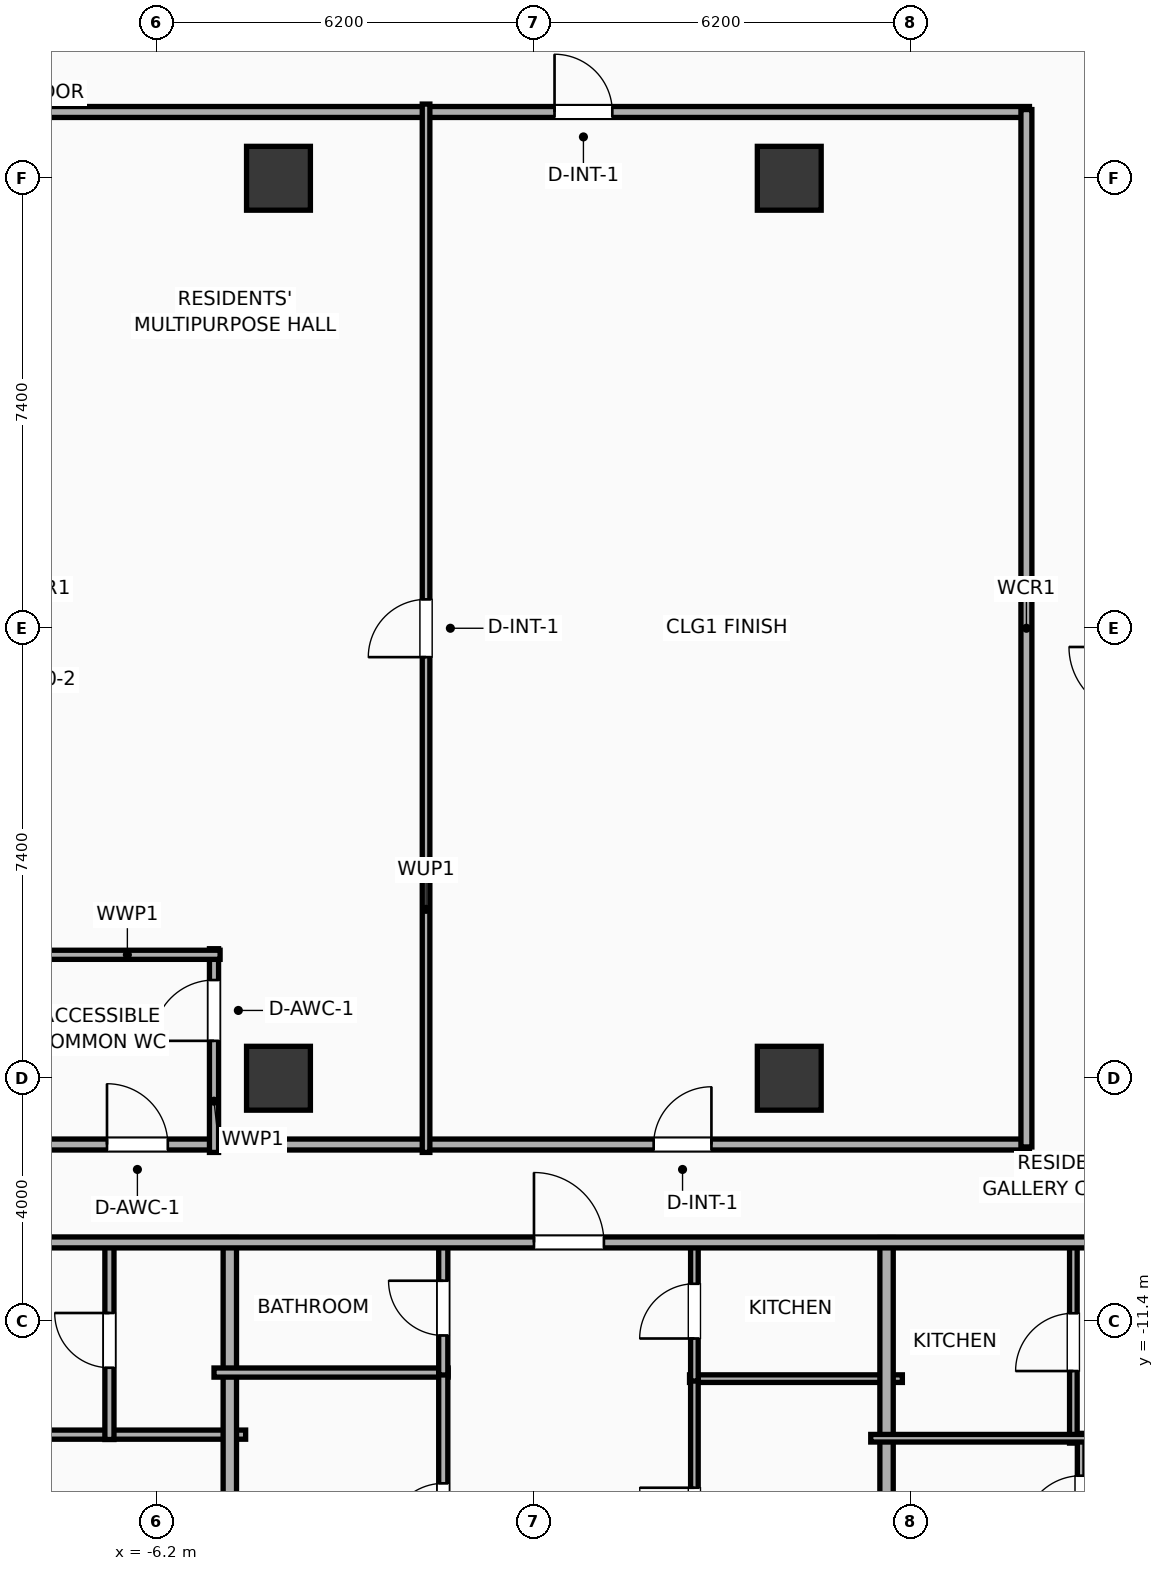
"""IFC4 building model, lengths in metres.
Left out: names, types, materials, properties, quantities, classifications, styles, units other than length and angle.
Written with IfcOpenShell. Run it as: python <this file> out.ifc"""

import sys

from ifc_helpers import new_model, si_unit, direction, frame, frame_2d, origin, origin_2d, place, context, subcontext, project, spatial, rectangle, extrude, element, fill, save


model = new_model("IFC4")
c1 = context("Model", 3, precision=1e-05, world=origin(), true_north=direction((0.0, 1.0)))
c2 = subcontext(c1, "Body", "Model", "MODEL_VIEW")
j1 = project(units=[si_unit("LENGTHUNIT", "METRE"), si_unit("PLANEANGLEUNIT", "RADIAN")], contexts=[c1])
p1 = place(None, origin())
s1 = spatial("IfcSite", under=j1, at=p1, CompositionType="ELEMENT")
p2 = place(p1, origin())
s2 = spatial("IfcBuilding", under=s1, at=p2, CompositionType="ELEMENT")
p3 = place(p2, frame((0.0, 0.0, 101.4)))
s3 = spatial("IfcBuildingStorey", under=s2, at=p3, CompositionType="ELEMENT", Elevation=101.4)
for number, where, z_axis, x_axis in (
    (1, (-4.2, -7.4, 0.0), (0.0, 0.0, 1.0), (1.0, 0.0, 0.0)),
    (2, (-4.2, 7.4, 0.0), (0.0, 0.0, 1.0), (1.0, 0.0, 0.0)),
    (3, (4.2, -7.4, 0.0), (0.0, 0.0, 1.0), (1.0, 0.0, 0.0)),
    (4, (4.2, 7.4, 0.0), (0.0, 0.0, 1.0), (1.0, 0.0, 0.0)),
):
    element("IfcColumn", number, at=place(p3, frame(where, z_axis=z_axis, x_axis=x_axis)), inside=s3, PredefinedType="COLUMN", context=c2, shape_type="SweptSolid", body=[
        extrude(rectangle(XDim=1.05, YDim=1.05, at=origin_2d()), origin(), (0.0, 0.0, 1.0), 3.9),
    ])
p4 = place(p3, frame((-8.15, 8.49, 0.0), z_axis=(0.0, 0.0, 1.0), x_axis=(1.0, 0.0, 0.0)))
e5 = element("IfcWall", 5, at=p4, inside=s3, PredefinedType="PARTITIONING", context=c2, shape_type="SweptSolid", body=[
    extrude(rectangle(XDim=16.3, YDim=0.18, at=frame_2d((8.15, 0.0))), origin(), (0.0, 0.0, 1.0), 3.65),
])
p5 = place(p4, frame((8.49, 0.0, 0.0)))
e6 = element("IfcOpeningElement", 6, at=p5, cuts=e5, PredefinedType="OPENING", context=c2, shape_type="SweptSolid", body=[
    extrude(rectangle(XDim=0.95, YDim=2.05, at=frame_2d((0.475, 1.025))), frame((0.0, 0.1, 0.0), z_axis=(0.0, -1.0, 0.0), x_axis=(1.0, 0.0, 0.0)), (0.0, 0.0, 1.0), 0.2),
])
p6 = place(p3, frame((-8.15, -8.49, 0.0), z_axis=(0.0, 0.0, 1.0), x_axis=(1.0, 0.0, 0.0)))
e7 = element("IfcWall", 7, at=p6, inside=s3, PredefinedType="PARTITIONING", context=c2, shape_type="SweptSolid", body=[
    extrude(rectangle(XDim=16.3, YDim=0.18, at=frame_2d((8.15, 0.0))), origin(), (0.0, 0.0, 1.0), 3.65),
])
p7 = place(p6, frame((1.13, 0.0, 0.0)))
e8 = element("IfcOpeningElement", 8, at=p7, cuts=e7, PredefinedType="OPENING", context=c2, shape_type="SweptSolid", body=[
    extrude(rectangle(XDim=1.0, YDim=2.05, at=frame_2d((0.5, 1.025))), frame((0.0, 0.1, 0.0), z_axis=(0.0, -1.0, 0.0), x_axis=(1.0, 0.0, 0.0)), (0.0, 0.0, 1.0), 0.2),
])
p8 = place(p6, frame((10.12, 0.0, 0.0)))
e9 = element("IfcOpeningElement", 9, at=p8, cuts=e7, PredefinedType="OPENING", context=c2, shape_type="SweptSolid", body=[
    extrude(rectangle(XDim=0.95, YDim=2.05, at=frame_2d((0.475, 1.025))), frame((0.0, 0.1, 0.0), z_axis=(0.0, -1.0, 0.0), x_axis=(1.0, 0.0, 0.0)), (0.0, 0.0, 1.0), 0.2),
])
p9 = place(p3, frame((8.1, -8.53, 0.0), z_axis=(0.0, 0.0, 1.0), x_axis=(0.0, 1.0, 0.0)))
e10 = element("IfcWall", 10, at=p9, inside=s3, PredefinedType="PARTITIONING", context=c2, shape_type="SweptSolid", body=[
    extrude(rectangle(XDim=17.06, YDim=0.18, at=frame_2d((8.53, 0.0))), origin(), (0.0, 0.0, 1.0), 3.65),
])
p10 = place(p3, frame((-5.26, -8.62, 0.0), z_axis=(0.0, 0.0, 1.0), x_axis=(0.0, 1.0, 0.0)))
e11 = element("IfcWall", 11, at=p10, inside=s3, PredefinedType="PLUMBINGWALL", context=c2, shape_type="SweptSolid", body=[
    extrude(rectangle(XDim=3.35, YDim=0.15, at=frame_2d((1.675, 0.0))), origin(), (0.0, 0.0, 1.0), 3.65),
])
p11 = place(p10, frame((1.835, 0.0, 0.0)))
e12 = element("IfcOpeningElement", 12, at=p11, cuts=e11, PredefinedType="OPENING", context=c2, shape_type="SweptSolid", body=[
    extrude(rectangle(XDim=1.0, YDim=2.05, at=frame_2d((0.5, 1.025))), frame((0.0, 0.085, 0.0), z_axis=(0.0, -1.0, 0.0), x_axis=(1.0, 0.0, 0.0)), (0.0, 0.0, 1.0), 0.17),
])
p12 = place(p3, frame((-8.21, -5.37, 0.0), z_axis=(0.0, 0.0, 1.0), x_axis=(1.0, 0.0, 0.0)))
e13 = element("IfcWall", 13, at=p12, inside=s3, PredefinedType="PLUMBINGWALL", context=c2, shape_type="SweptSolid", body=[
    extrude(rectangle(XDim=3.05, YDim=0.15, at=frame_2d((1.525, 0.0))), origin(), (0.0, 0.0, 1.0), 3.65),
])
p13 = place(p3, frame((-1.773, -8.62, 0.0), z_axis=(0.0, 0.0, 1.0), x_axis=(0.0, 1.0, 0.0)))
e14 = element("IfcWall", 14, at=p13, inside=s3, PredefinedType="PARTITIONING", context=c2, shape_type="SweptSolid", body=[
    extrude(rectangle(XDim=17.24, YDim=0.125, at=frame_2d((8.62, 0.0))), origin(), (0.0, 0.0, 1.0), 3.65),
])
p14 = place(p13, frame((8.145, 0.0, 0.0)))
e15 = element("IfcOpeningElement", 15, at=p14, cuts=e14, PredefinedType="OPENING", context=c2, shape_type="SweptSolid", body=[
    extrude(rectangle(XDim=0.95, YDim=2.05, at=frame_2d((0.475, 1.025))), frame((0.0, 0.073, 0.0), z_axis=(0.0, -1.0, 0.0), x_axis=(1.0, 0.0, 0.0)), (0.0, 0.0, 1.0), 0.145),
])
p15 = place(p3, frame((-8.53, -13.261, 0.0), z_axis=(0.0, 0.0, 1.0), x_axis=(1.0, 0.0, 0.0)))
e16 = element("IfcWall", 16, at=p15, inside=s3, PredefinedType="PLUMBINGWALL", context=c2, shape_type="SweptSolid", body=[
    extrude(rectangle(XDim=3.79, YDim=0.15, at=frame_2d((1.895, 0.0))), origin(), (0.0, 0.0, 1.0), 3.65),
])
p16 = place(p3, frame((-6.98, -13.341, 0.0), z_axis=(0.0, 0.0, 1.0), x_axis=(0.0, 1.0, 0.0)))
e17 = element("IfcWall", 17, at=p16, inside=s3, PredefinedType="PLUMBINGWALL", context=c2, shape_type="SweptSolid", body=[
    extrude(rectangle(XDim=3.261, YDim=0.15, at=frame_2d((1.63, 0.0))), origin(), (0.0, 0.0, 1.0), 3.65),
])
p17 = place(p16, frame((1.18, 0.0, 0.0)))
e18 = element("IfcOpeningElement", 18, at=p17, cuts=e17, PredefinedType="OPENING", context=c2, shape_type="SweptSolid", body=[
    extrude(rectangle(XDim=0.9, YDim=2.05, at=frame_2d((0.45, 1.025))), frame((0.0, 0.085, 0.0), z_axis=(0.0, -1.0, 0.0), x_axis=(1.0, 0.0, 0.0)), (0.0, 0.0, 1.0), 0.17),
])
p18 = place(p3, frame((-5.0, -20.41, 0.0), z_axis=(0.0, 0.0, 1.0), x_axis=(0.0, 1.0, 0.0)))
e19 = element("IfcWall", 19, at=p18, inside=s3, PredefinedType="PARTITIONING", context=c2, shape_type="SweptSolid", body=[
    extrude(rectangle(XDim=10.39, YDim=0.22, at=frame_2d((5.195, 0.0))), origin(), (0.0, 0.0, 1.0), 3.65),
])
p19 = place(p3, frame((-5.26, -12.24, 0.0), z_axis=(0.0, 0.0, 1.0), x_axis=(1.0, 0.0, 0.0)))
e20 = element("IfcWall", 20, at=p19, inside=s3, PredefinedType="PLUMBINGWALL", context=c2, shape_type="SweptSolid", body=[
    extrude(rectangle(XDim=3.85, YDim=0.15, at=frame_2d((1.925, 0.0))), origin(), (0.0, 0.0, 1.0), 3.65),
])
p20 = place(p3, frame((2.56, -12.34, 0.0), z_axis=(0.0, 0.0, 1.0), x_axis=(1.0, 0.0, 0.0)))
e21 = element("IfcWall", 21, at=p20, inside=s3, PredefinedType="PARTITIONING", context=c2, shape_type="SweptSolid", body=[
    extrude(rectangle(XDim=3.5, YDim=0.125, at=frame_2d((1.75, 0.0))), origin(), (0.0, 0.0, 1.0), 3.65),
])
p21 = place(p3, frame((-1.49, -20.458, 0.0), z_axis=(0.0, 0.0, 1.0), x_axis=(0.0, 1.0, 0.0)))
e22 = element("IfcWall", 22, at=p21, inside=s3, PredefinedType="PLUMBINGWALL", context=c2, shape_type="SweptSolid", body=[
    extrude(rectangle(XDim=8.258, YDim=0.15, at=frame_2d((4.129, 0.0))), origin(), (0.0, 0.0, 1.0), 3.65),
])
p22 = place(p21, frame((5.496, 0.0, 0.0)))
e23 = element("IfcOpeningElement", 23, at=p22, cuts=e22, PredefinedType="OPENING", context=c2, shape_type="SweptSolid", body=[
    extrude(rectangle(XDim=0.9, YDim=2.05, at=frame_2d((0.45, 1.025))), frame((0.0, 0.085, 0.0), z_axis=(0.0, -1.0, 0.0), x_axis=(1.0, 0.0, 0.0)), (0.0, 0.0, 1.0), 0.17),
])
p23 = place(p3, frame((-1.49, -12.28, 0.0), z_axis=(0.0, 0.0, 1.0), x_axis=(0.0, 1.0, 0.0)))
e24 = element("IfcWall", 24, at=p23, inside=s3, PredefinedType="PLUMBINGWALL", context=c2, shape_type="SweptSolid", body=[
    extrude(rectangle(XDim=2.2, YDim=0.15, at=frame_2d((1.1, 0.0))), origin(), (0.0, 0.0, 1.0), 3.65),
])
p24 = place(p23, frame((0.65, 0.0, 0.0)))
e25 = element("IfcOpeningElement", 25, at=p24, cuts=e24, PredefinedType="OPENING", context=c2, shape_type="SweptSolid", body=[
    extrude(rectangle(XDim=0.9, YDim=2.05, at=frame_2d((0.45, 1.025))), frame((0.0, 0.085, 0.0), z_axis=(0.0, -1.0, 0.0), x_axis=(1.0, 0.0, 0.0)), (0.0, 0.0, 1.0), 0.17),
])
p25 = place(p3, frame((2.64, -20.458, 0.0), z_axis=(0.0, 0.0, 1.0), x_axis=(0.0, 1.0, 0.0)))
e26 = element("IfcWall", 26, at=p25, inside=s3, PredefinedType="PARTITIONING", context=c2, shape_type="SweptSolid", body=[
    extrude(rectangle(XDim=8.157, YDim=0.125, at=frame_2d((4.079, 0.0))), origin(), (0.0, 0.0, 1.0), 3.65),
])
p26 = place(p25, frame((5.424, 0.0, 0.0)))
e27 = element("IfcOpeningElement", 27, at=p26, cuts=e26, PredefinedType="OPENING", context=c2, shape_type="SweptSolid", body=[
    extrude(rectangle(XDim=0.9, YDim=2.05, at=frame_2d((0.45, 1.025))), frame((0.0, 0.073, 0.0), z_axis=(0.0, -1.0, 0.0), x_axis=(1.0, 0.0, 0.0)), (0.0, 0.0, 1.0), 0.145),
])
p27 = place(p3, frame((2.64, -12.38, 0.0), z_axis=(0.0, 0.0, 1.0), x_axis=(0.0, 1.0, 0.0)))
e28 = element("IfcWall", 28, at=p27, inside=s3, PredefinedType="PARTITIONING", context=c2, shape_type="SweptSolid", body=[
    extrude(rectangle(XDim=2.3, YDim=0.125, at=frame_2d((1.15, 0.0))), origin(), (0.0, 0.0, 1.0), 3.65),
])
p28 = place(p27, frame((0.7, 0.0, 0.0)))
e29 = element("IfcOpeningElement", 29, at=p28, cuts=e28, PredefinedType="OPENING", context=c2, shape_type="SweptSolid", body=[
    extrude(rectangle(XDim=0.9, YDim=2.05, at=frame_2d((0.45, 1.025))), frame((0.0, 0.073, 0.0), z_axis=(0.0, -1.0, 0.0), x_axis=(1.0, 0.0, 0.0)), (0.0, 0.0, 1.0), 0.145),
])
p29 = place(p3, frame((5.8, -20.41, 0.0), z_axis=(0.0, 0.0, 1.0), x_axis=(0.0, 1.0, 0.0)))
e30 = element("IfcWall", 30, at=p29, inside=s3, PredefinedType="PARTITIONING", context=c2, shape_type="SweptSolid", body=[
    extrude(rectangle(XDim=10.39, YDim=0.22, at=frame_2d((5.195, 0.0))), origin(), (0.0, 0.0, 1.0), 3.04),
])
p30 = place(p3, frame((9.0, -20.56, 0.0), z_axis=(0.0, 0.0, 1.0), x_axis=(0.0, 1.0, 0.0)))
e31 = element("IfcWall", 31, at=p30, inside=s3, PredefinedType="PARTITIONING", context=c2, shape_type="SweptSolid", body=[
    extrude(rectangle(XDim=7.32, YDim=0.125, at=frame_2d((3.66, 0.0))), origin(), (0.0, 0.0, 1.0), 3.65),
])
p31 = place(p30, frame((5.674, 0.0, 0.0)))
e32 = element("IfcOpeningElement", 32, at=p31, cuts=e31, PredefinedType="OPENING", context=c2, shape_type="SweptSolid", body=[
    extrude(rectangle(XDim=0.95, YDim=2.05, at=frame_2d((0.475, 1.025))), frame((0.0, 0.073, 0.0), z_axis=(0.0, -1.0, 0.0), x_axis=(1.0, 0.0, 0.0)), (0.0, 0.0, 1.0), 0.145),
])
p32 = place(p3, frame((8.872, -13.4, 0.0), z_axis=(0.0, 0.0, 1.0), x_axis=(0.0, 1.0, 0.0)))
e33 = element("IfcWall", 33, at=p32, inside=s3, PredefinedType="PARTITIONING", context=c2, shape_type="SweptSolid", body=[
    extrude(rectangle(XDim=3.32, YDim=0.125, at=frame_2d((1.66, 0.0))), origin(), (0.0, 0.0, 1.0), 3.65),
])
p33 = place(p32, frame((1.185, 0.0, 0.0)))
e34 = element("IfcOpeningElement", 34, at=p33, cuts=e33, PredefinedType="OPENING", context=c2, shape_type="SweptSolid", body=[
    extrude(rectangle(XDim=0.95, YDim=2.05, at=frame_2d((0.475, 1.025))), frame((0.0, 0.073, 0.0), z_axis=(0.0, -1.0, 0.0), x_axis=(1.0, 0.0, 0.0)), (0.0, 0.0, 1.0), 0.145),
])
p34 = place(p3, frame((5.54, -13.32, 0.0), z_axis=(0.0, 0.0, 1.0), x_axis=(1.0, 0.0, 0.0)))
e35 = element("IfcWall", 35, at=p34, inside=s3, PredefinedType="PARTITIONING", context=c2, shape_type="SweptSolid", body=[
    extrude(rectangle(XDim=3.58, YDim=0.125, at=frame_2d((1.79, 0.0))), origin(), (0.0, 0.0, 1.0), 3.65),
])
p35 = place(p3, frame((-29.21, -10.1, 0.0), z_axis=(0.0, 0.0, 1.0), x_axis=(1.0, 0.0, 0.0)))
e36 = element("IfcWall", 36, at=p35, inside=s3, PredefinedType="PARTITIONING", context=c2, shape_type="SweptSolid", body=[
    extrude(rectangle(XDim=62.42, YDim=0.18, at=frame_2d((31.21, 0.0))), origin(), (0.0, 0.0, 1.0), 3.65),
])
p36 = place(p35, frame((3.033, 0.0, 0.0)))
e37 = element("IfcOpeningElement", 37, at=p36, cuts=e36, PredefinedType="OPENING", context=c2, shape_type="SweptSolid", body=[
    extrude(rectangle(XDim=0.9, YDim=2.05, at=frame_2d((0.45, 1.025))), frame((0.0, 0.1, 0.0), z_axis=(0.0, -1.0, 0.0), x_axis=(1.0, 0.0, 0.0)), (0.0, 0.0, 1.0), 0.2),
])
p37 = place(p35, frame((9.768, 0.0, 0.0)))
e38 = element("IfcOpeningElement", 38, at=p37, cuts=e36, PredefinedType="OPENING", context=c2, shape_type="SweptSolid", body=[
    extrude(rectangle(XDim=0.9, YDim=2.05, at=frame_2d((0.45, 1.025))), frame((0.0, 0.1, 0.0), z_axis=(0.0, -1.0, 0.0), x_axis=(1.0, 0.0, 0.0)), (0.0, 0.0, 1.0), 0.2),
])
p38 = place(p35, frame((18.65, 0.0, 0.0)))
e39 = element("IfcOpeningElement", 39, at=p38, cuts=e36, PredefinedType="OPENING", context=c2, shape_type="SweptSolid", body=[
    extrude(rectangle(XDim=1.15, YDim=2.05, at=frame_2d((0.575, 1.025))), frame((0.0, 0.1, 0.0), z_axis=(0.0, -1.0, 0.0), x_axis=(1.0, 0.0, 0.0)), (0.0, 0.0, 1.0), 0.2),
])
p39 = place(p35, frame((29.212, 0.0, 0.0)))
e40 = element("IfcOpeningElement", 40, at=p39, cuts=e36, PredefinedType="OPENING", context=c2, shape_type="SweptSolid", body=[
    extrude(rectangle(XDim=1.15, YDim=2.05, at=frame_2d((0.575, 1.025))), frame((0.0, 0.1, 0.0), z_axis=(0.0, -1.0, 0.0), x_axis=(1.0, 0.0, 0.0)), (0.0, 0.0, 1.0), 0.2),
])
p40 = place(p35, frame((40.379, 0.0, 0.0)))
e41 = element("IfcOpeningElement", 41, at=p40, cuts=e36, PredefinedType="OPENING", context=c2, shape_type="SweptSolid", body=[
    extrude(rectangle(XDim=1.15, YDim=2.05, at=frame_2d((0.575, 1.025))), frame((0.0, 0.1, 0.0), z_axis=(0.0, -1.0, 0.0), x_axis=(1.0, 0.0, 0.0)), (0.0, 0.0, 1.0), 0.2),
])
p41 = place(p35, frame((50.959, 0.0, 0.0)))
e42 = element("IfcOpeningElement", 42, at=p41, cuts=e36, PredefinedType="OPENING", context=c2, shape_type="SweptSolid", body=[
    extrude(rectangle(XDim=1.15, YDim=2.05, at=frame_2d((0.575, 1.025))), frame((0.0, 0.1, 0.0), z_axis=(0.0, -1.0, 0.0), x_axis=(1.0, 0.0, 0.0)), (0.0, 0.0, 1.0), 0.2),
])
p42 = place(p35, frame((59.117, 0.0, 0.0)))
e43 = element("IfcOpeningElement", 43, at=p42, cuts=e36, PredefinedType="OPENING", context=c2, shape_type="SweptSolid", body=[
    extrude(rectangle(XDim=0.9, YDim=2.05, at=frame_2d((0.45, 1.025))), frame((0.0, 0.1, 0.0), z_axis=(0.0, -1.0, 0.0), x_axis=(1.0, 0.0, 0.0)), (0.0, 0.0, 1.0), 0.2),
])
p43 = place(p5, origin())
e44 = element("IfcDoor", 44, at=p43, inside=s3, OperationType="SINGLE_SWING_LEFT", PredefinedType="DOOR", context=c2, shape_type="SweptSolid", body=[
    extrude(rectangle(XDim=0.95, YDim=2.05, at=frame_2d((0.475, 1.025))), frame((0.0, 0.025, 0.0), z_axis=(0.0, -1.0, 0.0), x_axis=(1.0, 0.0, 0.0)), (0.0, 0.0, 1.0), 0.05),
])
fill(e6, e44)
p44 = place(p7, origin())
e45 = element("IfcDoor", 45, at=p44, inside=s3, OperationType="SINGLE_SWING_LEFT", PredefinedType="DOOR", context=c2, shape_type="SweptSolid", body=[
    extrude(rectangle(XDim=1.0, YDim=2.05, at=frame_2d((0.5, 1.025))), frame((0.0, 0.025, 0.0), z_axis=(0.0, -1.0, 0.0), x_axis=(1.0, 0.0, 0.0)), (0.0, 0.0, 1.0), 0.05),
])
fill(e8, e45)
p45 = place(p8, origin())
e46 = element("IfcDoor", 46, at=p45, inside=s3, OperationType="SINGLE_SWING_RIGHT", PredefinedType="DOOR", context=c2, shape_type="SweptSolid", body=[
    extrude(rectangle(XDim=0.95, YDim=2.05, at=frame_2d((0.475, 1.025))), frame((0.0, 0.025, 0.0), z_axis=(0.0, -1.0, 0.0), x_axis=(1.0, 0.0, 0.0)), (0.0, 0.0, 1.0), 0.05),
])
fill(e9, e46)
p46 = place(p11, origin())
e47 = element("IfcDoor", 47, at=p46, inside=s3, OperationType="SINGLE_SWING_LEFT", PredefinedType="DOOR", context=c2, shape_type="SweptSolid", body=[
    extrude(rectangle(XDim=1.0, YDim=2.05, at=frame_2d((0.5, 1.025))), frame((0.0, 0.025, 0.0), z_axis=(0.0, -1.0, 0.0), x_axis=(1.0, 0.0, 0.0)), (0.0, 0.0, 1.0), 0.05),
])
fill(e12, e47)
p47 = place(p14, origin())
e48 = element("IfcDoor", 48, at=p47, inside=s3, OperationType="SINGLE_SWING_LEFT", PredefinedType="DOOR", context=c2, shape_type="SweptSolid", body=[
    extrude(rectangle(XDim=0.95, YDim=2.05, at=frame_2d((0.475, 1.025))), frame((0.0, 0.025, 0.0), z_axis=(0.0, -1.0, 0.0), x_axis=(1.0, 0.0, 0.0)), (0.0, 0.0, 1.0), 0.05),
])
fill(e15, e48)
p48 = place(p17, origin())
e49 = element("IfcDoor", 49, at=p48, inside=s3, OperationType="SINGLE_SWING_RIGHT", PredefinedType="DOOR", context=c2, shape_type="SweptSolid", body=[
    extrude(rectangle(XDim=0.9, YDim=2.05, at=frame_2d((0.45, 1.025))), frame((0.0, 0.025, 0.0), z_axis=(0.0, -1.0, 0.0), x_axis=(1.0, 0.0, 0.0)), (0.0, 0.0, 1.0), 0.05),
])
fill(e18, e49)
p49 = place(p22, origin())
e50 = element("IfcDoor", 50, at=p49, inside=s3, OperationType="SINGLE_SWING_LEFT", PredefinedType="DOOR", context=c2, shape_type="SweptSolid", body=[
    extrude(rectangle(XDim=0.9, YDim=2.05, at=frame_2d((0.45, 1.025))), frame((0.0, 0.025, 0.0), z_axis=(0.0, -1.0, 0.0), x_axis=(1.0, 0.0, 0.0)), (0.0, 0.0, 1.0), 0.05),
])
fill(e23, e50)
p50 = place(p24, origin())
e51 = element("IfcDoor", 51, at=p50, inside=s3, OperationType="SINGLE_SWING_RIGHT", PredefinedType="DOOR", context=c2, shape_type="SweptSolid", body=[
    extrude(rectangle(XDim=0.9, YDim=2.05, at=frame_2d((0.45, 1.025))), frame((0.0, 0.025, 0.0), z_axis=(0.0, -1.0, 0.0), x_axis=(1.0, 0.0, 0.0)), (0.0, 0.0, 1.0), 0.05),
])
fill(e25, e51)
p51 = place(p26, origin())
e52 = element("IfcDoor", 52, at=p51, inside=s3, OperationType="SINGLE_SWING_RIGHT", PredefinedType="DOOR", context=c2, shape_type="SweptSolid", body=[
    extrude(rectangle(XDim=0.9, YDim=2.05, at=frame_2d((0.45, 1.025))), frame((0.0, 0.025, 0.0), z_axis=(0.0, -1.0, 0.0), x_axis=(1.0, 0.0, 0.0)), (0.0, 0.0, 1.0), 0.05),
])
fill(e27, e52)
p52 = place(p28, origin())
e53 = element("IfcDoor", 53, at=p52, inside=s3, OperationType="SINGLE_SWING_LEFT", PredefinedType="DOOR", context=c2, shape_type="SweptSolid", body=[
    extrude(rectangle(XDim=0.9, YDim=2.05, at=frame_2d((0.45, 1.025))), frame((0.0, 0.025, 0.0), z_axis=(0.0, -1.0, 0.0), x_axis=(1.0, 0.0, 0.0)), (0.0, 0.0, 1.0), 0.05),
])
fill(e29, e53)
p53 = place(p31, origin())
e54 = element("IfcDoor", 54, at=p53, inside=s3, OperationType="SINGLE_SWING_LEFT", PredefinedType="DOOR", context=c2, shape_type="SweptSolid", body=[
    extrude(rectangle(XDim=0.95, YDim=2.05, at=frame_2d((0.475, 1.025))), frame((0.0, 0.025, 0.0), z_axis=(0.0, -1.0, 0.0), x_axis=(1.0, 0.0, 0.0)), (0.0, 0.0, 1.0), 0.05),
])
fill(e32, e54)
p54 = place(p33, origin())
e55 = element("IfcDoor", 55, at=p54, inside=s3, OperationType="SINGLE_SWING_LEFT", PredefinedType="DOOR", context=c2, shape_type="SweptSolid", body=[
    extrude(rectangle(XDim=0.95, YDim=2.05, at=frame_2d((0.475, 1.025))), frame((0.0, 0.025, 0.0), z_axis=(0.0, -1.0, 0.0), x_axis=(1.0, 0.0, 0.0)), (0.0, 0.0, 1.0), 0.05),
])
fill(e34, e55)
p55 = place(p39, origin())
e56 = element("IfcDoor", 56, at=p55, inside=s3, OperationType="SINGLE_SWING_LEFT", PredefinedType="DOOR", context=c2, shape_type="SweptSolid", body=[
    extrude(rectangle(XDim=1.15, YDim=2.05, at=frame_2d((0.575, 1.025))), frame((0.0, 0.025, 0.0), z_axis=(0.0, -1.0, 0.0), x_axis=(1.0, 0.0, 0.0)), (0.0, 0.0, 1.0), 0.05),
])
fill(e40, e56)
save(model, sys.argv[1])
